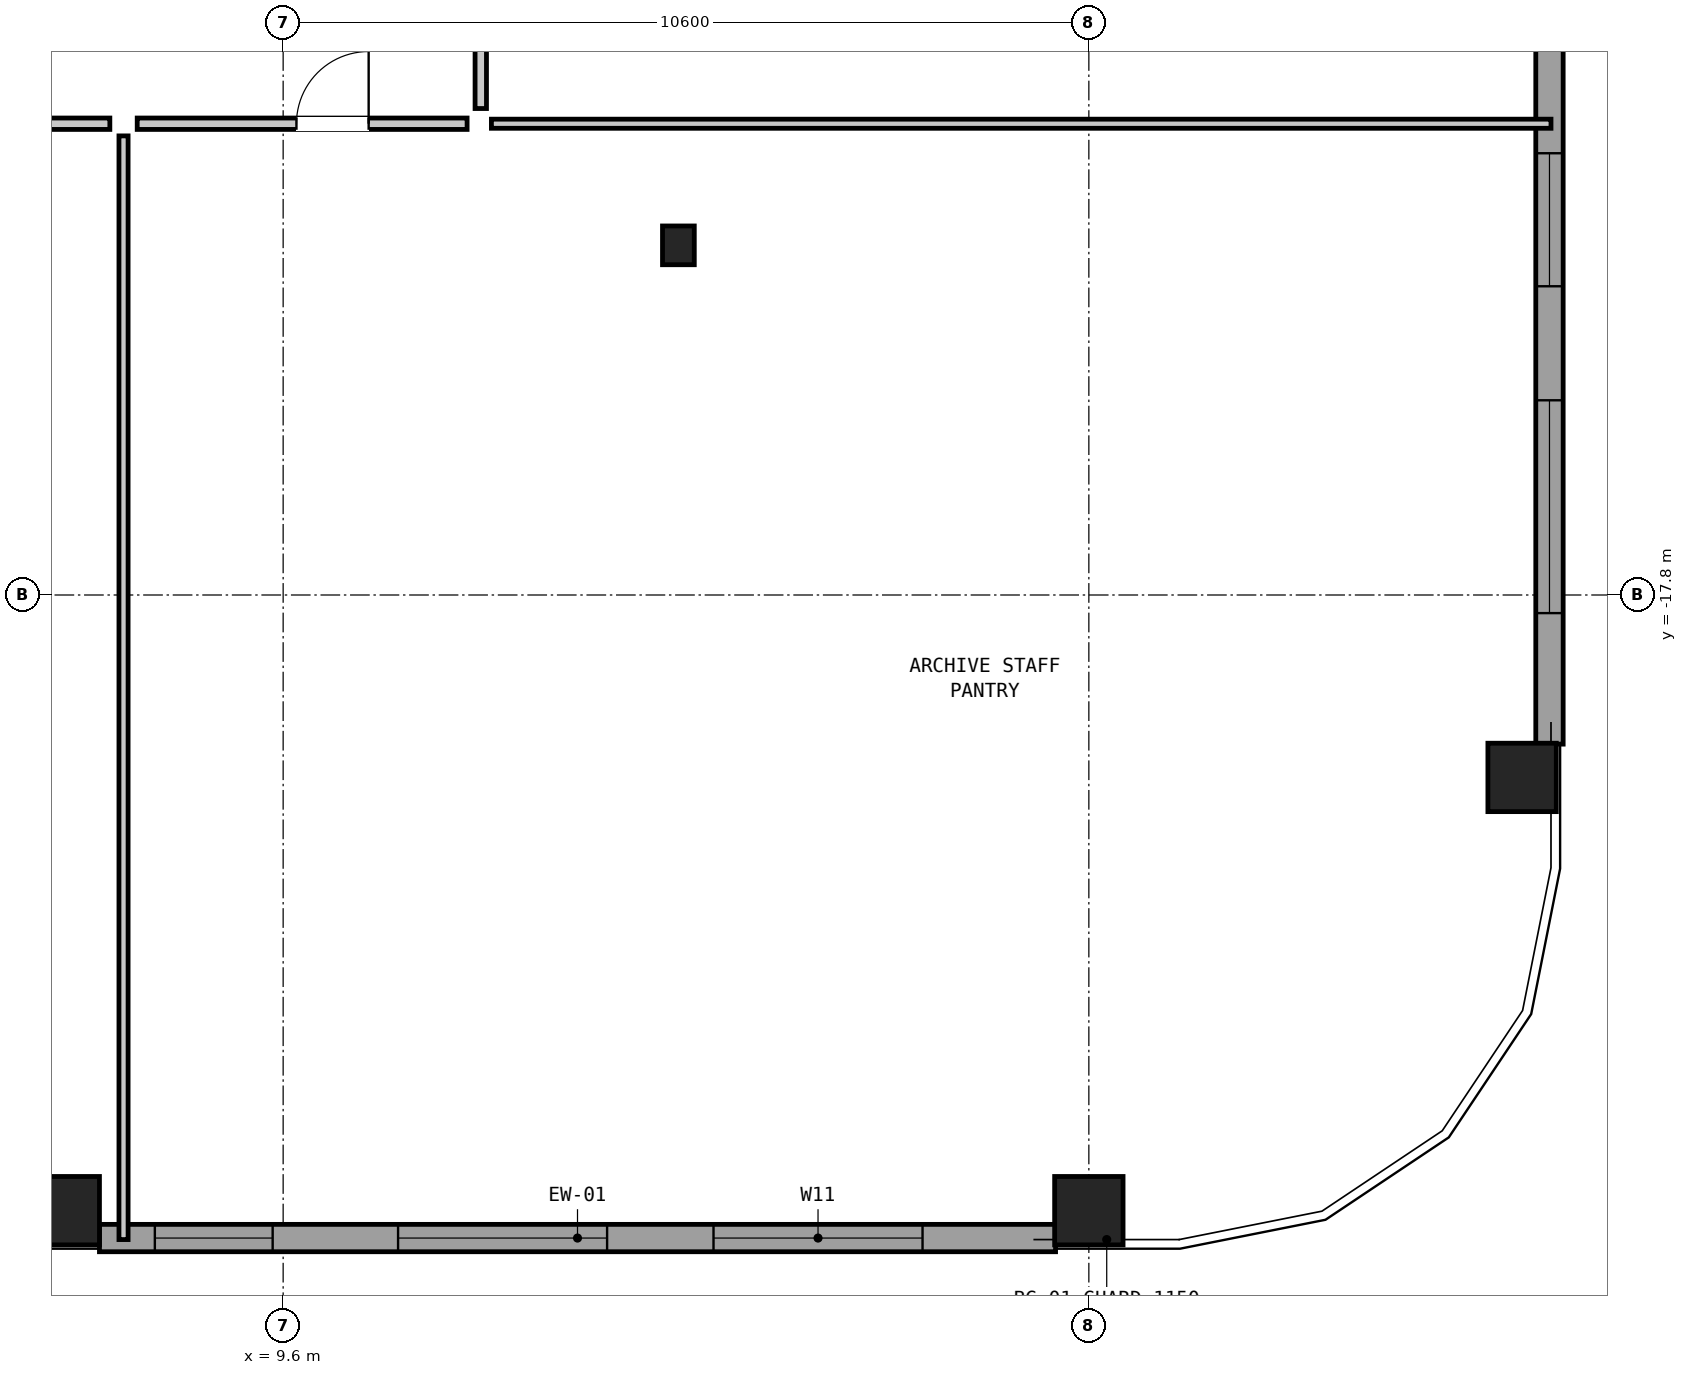
"""IFC4 building model, lengths in metres.
Left out: names, types, materials, properties, quantities, classifications, styles, units other than length and angle.
Written with IfcOpenShell. Run it as: python <this file> out.ifc"""

import sys

from ifc_helpers import new_model, si_unit, direction, frame, frame_2d, origin, origin_2d, place, context, subcontext, project, spatial, rectangle, hollow_rectangle, i_section, extrude, element, fill, save


model = new_model("IFC4")
c1 = context("Model", 3, precision=1e-05, world=origin(), true_north=direction((0.0, 1.0)))
c2 = subcontext(c1, "Body", "Model", "MODEL_VIEW")
j1 = project(units=[si_unit("LENGTHUNIT", "METRE"), si_unit("PLANEANGLEUNIT", "RADIAN")], contexts=[c1])
p1 = place(None, origin())
s1 = spatial("IfcSite", under=j1, at=p1, CompositionType="ELEMENT")
p2 = place(p1, origin())
s2 = spatial("IfcBuilding", under=s1, at=p2, CompositionType="ELEMENT")
p3 = place(p2, frame((0.0, 0.0, 47.45)))
s3 = spatial("IfcBuildingStorey", under=s2, at=p3, CompositionType="ELEMENT", Elevation=47.45)
for number, where, z_axis, x_axis in (
    (1, (6.733, -25.9, 0.0), (0.0, 0.0, 1.0), (1.0, 0.0, 0.0)),
    (2, (20.2, -25.9, 0.0), (0.0, 0.0, 1.0), (1.0, 0.0, 0.0)),
    (3, (25.9, -20.2, 0.0), (0.0, 0.0, 1.0), (0.0, 1.0, 0.0)),
):
    element("IfcColumn", number, at=place(p3, frame(where, z_axis=z_axis, x_axis=x_axis)), inside=s3, PredefinedType="COLUMN", context=c2, shape_type="SweptSolid", body=[
        extrude(hollow_rectangle(XDim=0.9, YDim=0.9, WallThickness=0.055, at=origin_2d()), origin(), (0.0, 0.0, 1.0), 3.05),
    ])
p4 = place(p3, frame((14.8, -13.2, 0.0), z_axis=(0.0, 0.0, 1.0), x_axis=(1.0, 0.0, 0.0)))
e4 = element("IfcColumn", 4, at=p4, inside=s3, PredefinedType="COLUMN", context=c2, shape_type="SweptSolid", body=[
    extrude(i_section(OverallWidth=0.418, OverallDepth=0.51, WebThickness=0.042, FlangeThickness=0.068, at=origin_2d()), origin(), (0.0, 0.0, 1.0), 3.05),
])
p5 = place(p3, frame((19.762, -26.26, 0.0), z_axis=(0.0, 0.0, 1.0), x_axis=(-1.0, 0.0, 0.0)))
e5 = element("IfcWall", 5, at=p5, inside=s3, PredefinedType="SOLIDWALL", context=c2, shape_type="SweptSolid", body=[
    extrude(rectangle(XDim=12.579, YDim=0.36, at=frame_2d((6.289, 0.0))), origin(), (0.0, 0.0, 1.0), 2.067),
])
p6 = place(p5, frame((1.75, 0.0, 0.2)))
e6 = element("IfcOpeningElement", 6, at=p6, cuts=e5, PredefinedType="OPENING", context=c2, shape_type="SweptSolid", body=[
    extrude(rectangle(XDim=2.75, YDim=0.95, at=frame_2d((1.375, 0.475))), frame((0.0, 0.192, 0.0), z_axis=(0.0, -1.0, 0.0), x_axis=(1.0, 0.0, 0.0)), (0.0, 0.0, 1.0), 0.384),
])
p7 = place(p5, frame((5.9, 0.0, 0.95)))
e7 = element("IfcOpeningElement", 7, at=p7, cuts=e5, PredefinedType="OPENING", context=c2, shape_type="SweptSolid", body=[
    extrude(rectangle(XDim=2.75, YDim=0.95, at=frame_2d((1.375, 0.475))), frame((0.0, 0.192, 0.0), z_axis=(0.0, -1.0, 0.0), x_axis=(1.0, 0.0, 0.0)), (0.0, 0.0, 1.0), 0.384),
])
p8 = place(p5, frame((10.3, 0.0, 0.2)))
e8 = element("IfcOpeningElement", 8, at=p8, cuts=e5, PredefinedType="OPENING", context=c2, shape_type="SweptSolid", body=[
    extrude(rectangle(XDim=1.55, YDim=1.1, at=frame_2d((0.775, 0.55))), frame((0.0, 0.192, 0.0), z_axis=(0.0, -1.0, 0.0), x_axis=(1.0, 0.0, 0.0)), (0.0, 0.0, 1.0), 0.384),
])
p9 = place(p3, frame((26.26, -7.183, 0.0), z_axis=(0.0, 0.0, 1.0), x_axis=(0.0, -1.0, 0.0)))
e9 = element("IfcWall", 9, at=p9, inside=s3, PredefinedType="SOLIDWALL", context=c2, shape_type="SweptSolid", body=[
    extrude(rectangle(XDim=12.579, YDim=0.36, at=frame_2d((6.289, 0.0))), origin(), (0.0, 0.0, 1.0), 2.067),
])
p10 = place(p9, frame((0.055, 0.0, 0.2)))
e10 = element("IfcOpeningElement", 10, at=p10, cuts=e9, PredefinedType="OPENING", context=c2, shape_type="SweptSolid", body=[
    extrude(rectangle(XDim=2.25, YDim=1.15, at=frame_2d((1.125, 0.575))), frame((0.0, 0.192, 0.0), z_axis=(0.0, -1.0, 0.0), x_axis=(1.0, 0.0, 0.0)), (0.0, 0.0, 1.0), 0.384),
])
p11 = place(p9, frame((4.805, 0.0, 0.8)))
e11 = element("IfcOpeningElement", 11, at=p11, cuts=e9, PredefinedType="OPENING", context=c2, shape_type="SweptSolid", body=[
    extrude(rectangle(XDim=1.75, YDim=1.1, at=frame_2d((0.875, 0.55))), frame((0.0, 0.192, 0.0), z_axis=(0.0, -1.0, 0.0), x_axis=(1.0, 0.0, 0.0)), (0.0, 0.0, 1.0), 0.384),
])
p12 = place(p9, frame((8.055, 0.0, 0.2)))
e12 = element("IfcOpeningElement", 12, at=p12, cuts=e9, PredefinedType="OPENING", context=c2, shape_type="SweptSolid", body=[
    extrude(rectangle(XDim=2.8, YDim=1.0, at=frame_2d((1.4, 0.5))), frame((0.0, 0.192, 0.0), z_axis=(0.0, -1.0, 0.0), x_axis=(1.0, 0.0, 0.0)), (0.0, 0.0, 1.0), 0.384),
])
p13 = place(p3, frame((12.34, -11.6, 0.0), z_axis=(0.0, 0.0, 1.0), x_axis=(1.0, 0.0, 0.0)))
e13 = element("IfcWall", 13, at=p13, inside=s3, PredefinedType="PARTITIONING", context=c2, shape_type="SweptSolid", body=[
    extrude(rectangle(XDim=13.94, YDim=0.12, at=frame_2d((6.97, 0.0))), origin(), (0.0, 0.0, 1.0), 2.274),
])
p14 = place(p3, frame((7.5, -26.28, 0.0), z_axis=(0.0, 0.0, 1.0), x_axis=(0.0, 1.0, 0.0)))
e14 = element("IfcWall", 14, at=p14, inside=s3, PredefinedType="PARTITIONING", context=c2, shape_type="SweptSolid", body=[
    extrude(rectangle(XDim=14.52, YDim=0.12, at=frame_2d((7.26, 0.0))), origin(), (0.0, 0.0, 1.0), 2.83),
])
p15 = place(p3, frame((1.68, -11.6, 0.0), z_axis=(0.0, 0.0, 1.0), x_axis=(1.0, 0.0, 0.0)))
e15 = element("IfcWall", 15, at=p15, inside=s3, PredefinedType="PARTITIONING", context=c2, shape_type="SweptSolid", body=[
    extrude(rectangle(XDim=5.64, YDim=0.15, at=frame_2d((2.82, 0.0))), origin(), (0.0, 0.0, 1.0), 2.83),
])
p16 = place(p15, frame((2.22, 0.0, 0.0)))
e16 = element("IfcOpeningElement", 16, at=p16, cuts=e15, PredefinedType="OPENING", context=c2, shape_type="SweptSolid", body=[
    extrude(rectangle(XDim=1.2, YDim=2.1, at=frame_2d((0.6, 1.05))), frame((0.0, 0.087, 0.0), z_axis=(0.0, -1.0, 0.0), x_axis=(1.0, 0.0, 0.0)), (0.0, 0.0, 1.0), 0.174),
])
p17 = place(p3, frame((7.68, -11.6, 0.0), z_axis=(0.0, 0.0, 1.0), x_axis=(1.0, 0.0, 0.0)))
e17 = element("IfcWall", 17, at=p17, inside=s3, PredefinedType="PARTITIONING", context=c2, shape_type="SweptSolid", body=[
    extrude(rectangle(XDim=4.34, YDim=0.15, at=frame_2d((2.17, 0.0))), origin(), (0.0, 0.0, 1.0), 2.274),
])
p18 = place(p17, frame((2.095, 0.0, 0.0)))
e18 = element("IfcOpeningElement", 18, at=p18, cuts=e17, PredefinedType="OPENING", context=c2, shape_type="SweptSolid", body=[
    extrude(rectangle(XDim=0.95, YDim=2.1, at=frame_2d((0.475, 1.05))), frame((0.0, 0.087, 0.0), z_axis=(0.0, -1.0, 0.0), x_axis=(1.0, 0.0, 0.0)), (0.0, 0.0, 1.0), 0.174),
])
p19 = place(p3, frame((12.2, -11.4, 0.0), z_axis=(0.0, 0.0, 1.0), x_axis=(0.0, 1.0, 0.0)))
e19 = element("IfcWall", 19, at=p19, inside=s3, PredefinedType="PARTITIONING", context=c2, shape_type="SweptSolid", body=[
    extrude(rectangle(XDim=8.84, YDim=0.15, at=frame_2d((4.42, 0.0))), origin(), (0.0, 0.0, 1.0), 2.83),
])
p20 = place(p19, frame((3.945, 0.0, 0.0)))
e20 = element("IfcOpeningElement", 20, at=p20, cuts=e19, PredefinedType="OPENING", context=c2, shape_type="SweptSolid", body=[
    extrude(rectangle(XDim=0.95, YDim=2.1, at=frame_2d((0.475, 1.05))), frame((0.0, 0.087, 0.0), z_axis=(0.0, -1.0, 0.0), x_axis=(1.0, 0.0, 0.0)), (0.0, 0.0, 1.0), 0.174),
])
p21 = place(p6, origin())
e21 = element("IfcWindow", 21, at=p21, inside=s3, PartitioningType="SINGLE_PANEL", PredefinedType="WINDOW", context=c2, shape_type="SweptSolid", body=[
    extrude(rectangle(XDim=2.75, YDim=0.95, at=frame_2d((1.375, 0.475))), frame((0.0, 0.03, 0.0), z_axis=(0.0, -1.0, 0.0), x_axis=(1.0, 0.0, 0.0)), (0.0, 0.0, 1.0), 0.06),
])
fill(e6, e21)
p22 = place(p7, origin())
e22 = element("IfcWindow", 22, at=p22, inside=s3, PartitioningType="SINGLE_PANEL", PredefinedType="WINDOW", context=c2, shape_type="SweptSolid", body=[
    extrude(rectangle(XDim=2.75, YDim=0.95, at=frame_2d((1.375, 0.475))), frame((0.0, 0.03, 0.0), z_axis=(0.0, -1.0, 0.0), x_axis=(1.0, 0.0, 0.0)), (0.0, 0.0, 1.0), 0.06),
])
fill(e7, e22)
p23 = place(p8, origin())
e23 = element("IfcWindow", 23, at=p23, inside=s3, PartitioningType="SINGLE_PANEL", PredefinedType="WINDOW", context=c2, shape_type="SweptSolid", body=[
    extrude(rectangle(XDim=1.55, YDim=1.1, at=frame_2d((0.775, 0.55))), frame((0.0, 0.03, 0.0), z_axis=(0.0, -1.0, 0.0), x_axis=(1.0, 0.0, 0.0)), (0.0, 0.0, 1.0), 0.06),
])
fill(e8, e23)
p24 = place(p11, origin())
e24 = element("IfcWindow", 24, at=p24, inside=s3, PartitioningType="SINGLE_PANEL", PredefinedType="WINDOW", context=c2, shape_type="SweptSolid", body=[
    extrude(rectangle(XDim=1.75, YDim=1.1, at=frame_2d((0.875, 0.55))), frame((0.0, 0.03, 0.0), z_axis=(0.0, -1.0, 0.0), x_axis=(1.0, 0.0, 0.0)), (0.0, 0.0, 1.0), 0.06),
])
fill(e11, e24)
p25 = place(p12, origin())
e25 = element("IfcWindow", 25, at=p25, inside=s3, PartitioningType="SINGLE_PANEL", PredefinedType="WINDOW", context=c2, shape_type="SweptSolid", body=[
    extrude(rectangle(XDim=2.8, YDim=1.0, at=frame_2d((1.4, 0.5))), frame((0.0, 0.03, 0.0), z_axis=(0.0, -1.0, 0.0), x_axis=(1.0, 0.0, 0.0)), (0.0, 0.0, 1.0), 0.06),
])
fill(e12, e25)
p26 = place(p18, origin())
e26 = element("IfcDoor", 26, at=p26, inside=s3, OperationType="SINGLE_SWING_RIGHT", PredefinedType="DOOR", context=c2, shape_type="SweptSolid", body=[
    extrude(rectangle(XDim=0.95, YDim=2.1, at=frame_2d((0.475, 1.05))), frame((0.0, 0.025, 0.0), z_axis=(0.0, -1.0, 0.0), x_axis=(1.0, 0.0, 0.0)), (0.0, 0.0, 1.0), 0.05),
])
fill(e18, e26)
save(model, sys.argv[1])
